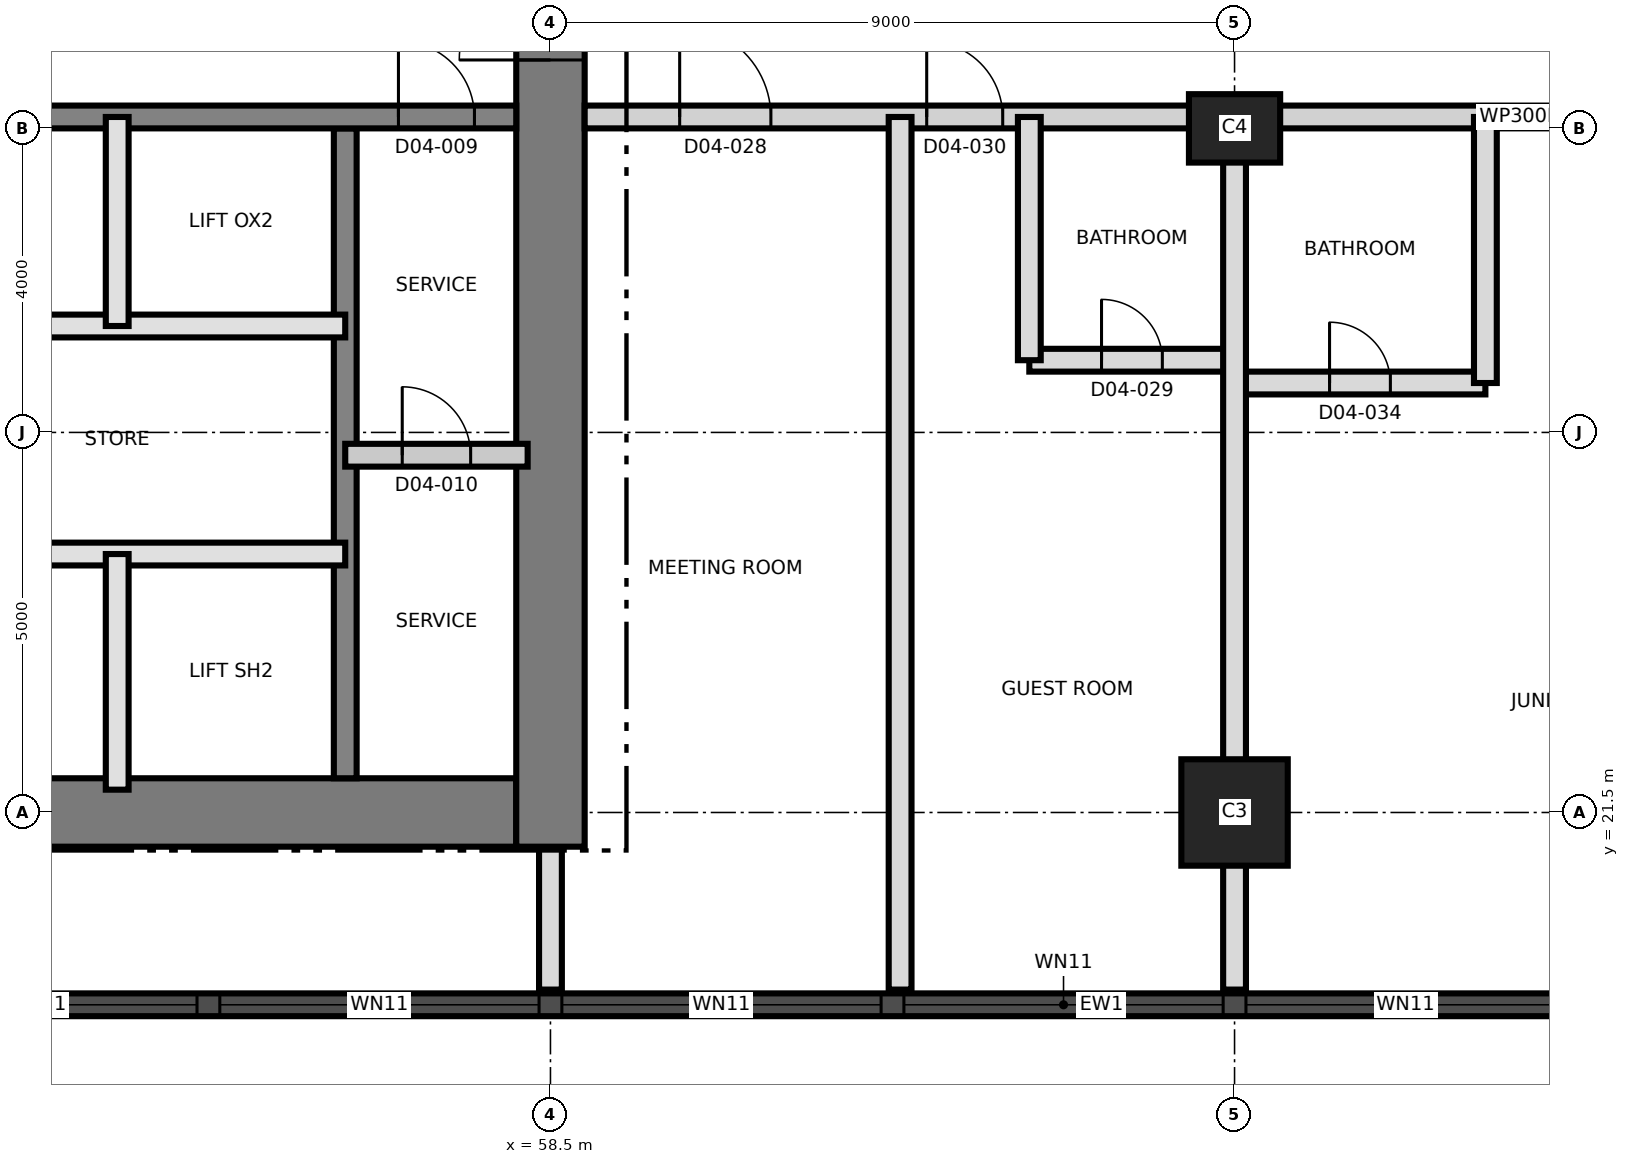
"""IFC4 building model, lengths in metres.
Left out: names, types, materials, properties, quantities, classifications, styles, units other than length and angle.
Written with IfcOpenShell. Run it as: python <this file> out.ifc"""

import sys

from ifc_helpers import new_model, si_unit, direction, frame, frame_2d, origin, origin_2d, place, context, subcontext, project, spatial, rectangle, extrude, element, fill, save


model = new_model("IFC4")
c1 = context("Model", 3, precision=1e-05, world=origin(), true_north=direction((0.0, 1.0)))
c2 = subcontext(c1, "Body", "Model", "MODEL_VIEW")
j1 = project(units=[si_unit("LENGTHUNIT", "METRE"), si_unit("PLANEANGLEUNIT", "RADIAN")], contexts=[c1])
p1 = place(None, origin())
s1 = spatial("IfcSite", under=j1, at=p1, CompositionType="ELEMENT")
p2 = place(p1, origin())
s2 = spatial("IfcBuilding", under=s1, at=p2, CompositionType="ELEMENT")
p3 = place(p2, frame((0.0, 0.0, 63.1)))
s3 = spatial("IfcBuildingStorey", under=s2, at=p3, CompositionType="ELEMENT", Elevation=63.1)
p4 = place(p3, frame((31.05, 21.5, 0.0), z_axis=(0.0, 0.0, 1.0), x_axis=(1.0, 0.0, 0.0)))
e1 = element("IfcWall", 1, at=p4, inside=s3, PredefinedType="SHEAR", context=c2, shape_type="SweptSolid", body=[
    extrude(rectangle(XDim=27.0, YDim=0.9, at=frame_2d((13.5, 0.0))), origin(), (0.0, 0.0, 1.0), 3.7),
])
p5 = place(p3, frame((58.5, 21.05, 0.0), z_axis=(0.0, 0.0, 1.0), x_axis=(0.0, 1.0, 0.0)))
e2 = element("IfcWall", 2, at=p5, inside=s3, PredefinedType="SHEAR", context=c2, shape_type="SweptSolid", body=[
    extrude(rectangle(XDim=18.9, YDim=0.9, at=frame_2d((9.45, 0.0))), origin(), (0.0, 0.0, 1.0), 3.7),
])
p6 = place(p5, frame((10.35, 0.0, 0.0)))
e3 = element("IfcOpeningElement", 3, at=p6, cuts=e2, PredefinedType="OPENING", context=c2, shape_type="SweptSolid", body=[
    extrude(rectangle(XDim=1.2, YDim=2.1, at=frame_2d((0.6, 1.05))), frame((0.0, 0.46, 0.0), z_axis=(0.0, -1.0, 0.0), x_axis=(1.0, 0.0, 0.0)), (0.0, 0.0, 1.0), 0.92),
])
p7 = place(p3, frame((55.8, 21.95, 0.0), z_axis=(0.0, 0.0, 1.0), x_axis=(0.0, 1.0, 0.0)))
e4 = element("IfcWall", 4, at=p7, inside=s3, PredefinedType="SHEAR", context=c2, shape_type="SweptSolid", body=[
    extrude(rectangle(XDim=8.55, YDim=0.3, at=frame_2d((4.275, 0.0))), origin(), (0.0, 0.0, 1.0), 3.7),
])
p8 = place(p3, frame((31.95, 30.65, 0.0), z_axis=(0.0, 0.0, 1.0), x_axis=(1.0, 0.0, 0.0)))
e5 = element("IfcWall", 5, at=p8, inside=s3, PredefinedType="SHEAR", context=c2, shape_type="SweptSolid", body=[
    extrude(rectangle(XDim=26.1, YDim=0.3, at=frame_2d((13.05, 0.0))), origin(), (0.0, 0.0, 1.0), 3.7),
])
p9 = place(p8, frame((24.55, 0.0, 0.0)))
e6 = element("IfcOpeningElement", 6, at=p9, cuts=e5, PredefinedType="OPENING", context=c2, shape_type="SweptSolid", body=[
    extrude(rectangle(XDim=1.0, YDim=2.1, at=frame_2d((0.5, 1.05))), frame((0.0, 0.16, 0.0), z_axis=(0.0, -1.0, 0.0), x_axis=(1.0, 0.0, 0.0)), (0.0, 0.0, 1.0), 0.32),
])
p10 = place(p8, frame((11.35, 0.0, 0.0)))
e7 = element("IfcOpeningElement", 7, at=p10, cuts=e5, PredefinedType="OPENING", context=c2, shape_type="SweptSolid", body=[
    extrude(rectangle(XDim=1.0, YDim=2.1, at=frame_2d((0.5, 1.05))), frame((0.0, 0.16, 0.0), z_axis=(0.0, -1.0, 0.0), x_axis=(1.0, 0.0, 0.0)), (0.0, 0.0, 1.0), 0.32),
])
p11 = place(p3, frame((67.5, 21.5, 0.0), z_axis=(0.0, 0.0, 1.0), x_axis=(1.0, 0.0, 0.0)))
e8 = element("IfcColumn", 8, at=p11, inside=s3, PredefinedType="COLUMN", context=c2, shape_type="SweptSolid", body=[
    extrude(rectangle(XDim=1.4, YDim=1.4, at=origin_2d()), origin(), (0.0, 0.0, 1.0), 3.7),
])
p12 = place(p3, frame((67.5, 30.5, 0.0), z_axis=(0.0, 0.0, 1.0), x_axis=(1.0, 0.0, 0.0)))
e9 = element("IfcColumn", 9, at=p12, inside=s3, PredefinedType="COLUMN", context=c2, shape_type="SweptSolid", body=[
    extrude(rectangle(XDim=1.2, YDim=0.9, at=origin_2d()), origin(), (0.0, 0.0, 1.0), 3.7),
])
p13 = place(p3, frame((44.01, 18.97, 0.0), z_axis=(0.0, 0.0, 1.0), x_axis=(1.0, 0.0, 0.0)))
e10 = element("IfcWall", 10, at=p13, inside=s3, PredefinedType="SOLIDWALL", context=c2, shape_type="SweptSolid", body=[
    extrude(rectangle(XDim=43.478, YDim=0.3, at=frame_2d((21.739, 0.0))), origin(), (0.0, 0.0, 1.0), 3.4),
])
p14 = place(p13, frame((1.845, 0.0, 0.3)))
e11 = element("IfcOpeningElement", 11, at=p14, cuts=e10, PredefinedType="OPENING", context=c2, shape_type="SweptSolid", body=[
    extrude(rectangle(XDim=1.8, YDim=2.4, at=frame_2d((0.9, 1.2))), frame((0.0, 0.16, 0.0), z_axis=(0.0, -1.0, 0.0), x_axis=(1.0, 0.0, 0.0)), (0.0, 0.0, 1.0), 0.32),
])
p15 = place(p13, frame((5.64, 0.0, 0.9)))
e12 = element("IfcOpeningElement", 12, at=p15, cuts=e10, PredefinedType="OPENING", context=c2, shape_type="SweptSolid", body=[
    extrude(rectangle(XDim=4.2, YDim=1.5, at=frame_2d((2.1, 0.75))), frame((0.0, 0.16, 0.0), z_axis=(0.0, -1.0, 0.0), x_axis=(1.0, 0.0, 0.0)), (0.0, 0.0, 1.0), 0.32),
])
p16 = place(p13, frame((10.14, 0.0, 0.9)))
e13 = element("IfcOpeningElement", 13, at=p16, cuts=e10, PredefinedType="OPENING", context=c2, shape_type="SweptSolid", body=[
    extrude(rectangle(XDim=4.2, YDim=1.5, at=frame_2d((2.1, 0.75))), frame((0.0, 0.16, 0.0), z_axis=(0.0, -1.0, 0.0), x_axis=(1.0, 0.0, 0.0)), (0.0, 0.0, 1.0), 0.32),
])
p17 = place(p13, frame((14.64, 0.0, 0.9)))
e14 = element("IfcOpeningElement", 14, at=p17, cuts=e10, PredefinedType="OPENING", context=c2, shape_type="SweptSolid", body=[
    extrude(rectangle(XDim=4.2, YDim=1.5, at=frame_2d((2.1, 0.75))), frame((0.0, 0.16, 0.0), z_axis=(0.0, -1.0, 0.0), x_axis=(1.0, 0.0, 0.0)), (0.0, 0.0, 1.0), 0.32),
])
p18 = place(p13, frame((19.14, 0.0, 0.9)))
e15 = element("IfcOpeningElement", 15, at=p18, cuts=e10, PredefinedType="OPENING", context=c2, shape_type="SweptSolid", body=[
    extrude(rectangle(XDim=4.2, YDim=1.5, at=frame_2d((2.1, 0.75))), frame((0.0, 0.16, 0.0), z_axis=(0.0, -1.0, 0.0), x_axis=(1.0, 0.0, 0.0)), (0.0, 0.0, 1.0), 0.32),
])
p19 = place(p13, frame((23.64, 0.0, 0.9)))
e16 = element("IfcOpeningElement", 16, at=p19, cuts=e10, PredefinedType="OPENING", context=c2, shape_type="SweptSolid", body=[
    extrude(rectangle(XDim=4.2, YDim=1.5, at=frame_2d((2.1, 0.75))), frame((0.0, 0.16, 0.0), z_axis=(0.0, -1.0, 0.0), x_axis=(1.0, 0.0, 0.0)), (0.0, 0.0, 1.0), 0.32),
])
p20 = place(p13, frame((28.14, 0.0, 0.9)))
e17 = element("IfcOpeningElement", 17, at=p20, cuts=e10, PredefinedType="OPENING", context=c2, shape_type="SweptSolid", body=[
    extrude(rectangle(XDim=4.2, YDim=1.5, at=frame_2d((2.1, 0.75))), frame((0.0, 0.16, 0.0), z_axis=(0.0, -1.0, 0.0), x_axis=(1.0, 0.0, 0.0)), (0.0, 0.0, 1.0), 0.32),
])
p21 = place(p13, frame((32.64, 0.0, 0.9)))
e18 = element("IfcOpeningElement", 18, at=p21, cuts=e10, PredefinedType="OPENING", context=c2, shape_type="SweptSolid", body=[
    extrude(rectangle(XDim=4.2, YDim=1.5, at=frame_2d((2.1, 0.75))), frame((0.0, 0.16, 0.0), z_axis=(0.0, -1.0, 0.0), x_axis=(1.0, 0.0, 0.0)), (0.0, 0.0, 1.0), 0.32),
])
p22 = place(p13, frame((37.14, 0.0, 0.9)))
e19 = element("IfcOpeningElement", 19, at=p22, cuts=e10, PredefinedType="OPENING", context=c2, shape_type="SweptSolid", body=[
    extrude(rectangle(XDim=4.2, YDim=1.5, at=frame_2d((2.1, 0.75))), frame((0.0, 0.16, 0.0), z_axis=(0.0, -1.0, 0.0), x_axis=(1.0, 0.0, 0.0)), (0.0, 0.0, 1.0), 0.32),
])
p23 = place(p3, frame((46.8, 24.9, 0.0), z_axis=(0.0, 0.0, 1.0), x_axis=(1.0, 0.0, 0.0)))
e20 = element("IfcWall", 20, at=p23, inside=s3, PredefinedType="SOLIDWALL", context=c2, shape_type="SweptSolid", body=[
    extrude(rectangle(XDim=9.0, YDim=0.3, at=frame_2d((4.5, 0.0))), origin(), (0.0, 0.0, 1.0), 3.4),
])
p24 = place(p23, frame((1.05, 0.0, 0.0)))
e21 = element("IfcOpeningElement", 21, at=p24, cuts=e20, PredefinedType="OPENING", context=c2, shape_type="SweptSolid", body=[
    extrude(rectangle(XDim=0.9, YDim=2.1, at=frame_2d((0.45, 1.05))), frame((0.0, 0.16, 0.0), z_axis=(0.0, -1.0, 0.0), x_axis=(1.0, 0.0, 0.0)), (0.0, 0.0, 1.0), 0.32),
])
p25 = place(p3, frame((55.8, 26.2, 0.0), z_axis=(0.0, 0.0, 1.0), x_axis=(1.0, 0.0, 0.0)))
e22 = element("IfcWall", 22, at=p25, inside=s3, PredefinedType="PARTITIONING", context=c2, shape_type="SweptSolid", body=[
    extrude(rectangle(XDim=2.4, YDim=0.3, at=frame_2d((1.2, 0.0))), origin(), (0.0, 0.0, 1.0), 3.4),
])
p26 = place(p25, frame((0.75, 0.0, 0.0)))
e23 = element("IfcOpeningElement", 23, at=p26, cuts=e22, PredefinedType="OPENING", context=c2, shape_type="SweptSolid", body=[
    extrude(rectangle(XDim=0.9, YDim=2.1, at=frame_2d((0.45, 1.05))), frame((0.0, 0.16, 0.0), z_axis=(0.0, -1.0, 0.0), x_axis=(1.0, 0.0, 0.0)), (0.0, 0.0, 1.0), 0.32),
])
p27 = place(p3, frame((49.8, 27.9, 0.0), z_axis=(0.0, 0.0, 1.0), x_axis=(1.0, 0.0, 0.0)))
e24 = element("IfcWall", 24, at=p27, inside=s3, PredefinedType="SOLIDWALL", context=c2, shape_type="SweptSolid", body=[
    extrude(rectangle(XDim=6.0, YDim=0.3, at=frame_2d((3.0, 0.0))), origin(), (0.0, 0.0, 1.0), 3.4),
])
p28 = place(p3, frame((52.8, 21.8, 0.0), z_axis=(0.0, 0.0, 1.0), x_axis=(0.0, 1.0, 0.0)))
e25 = element("IfcWall", 25, at=p28, inside=s3, PredefinedType="SOLIDWALL", context=c2, shape_type="SweptSolid", body=[
    extrude(rectangle(XDim=3.1, YDim=0.3, at=frame_2d((1.55, 0.0))), origin(), (0.0, 0.0, 1.0), 3.4),
])
p29 = place(p3, frame((52.8, 27.9, 0.0), z_axis=(0.0, 0.0, 1.0), x_axis=(0.0, 1.0, 0.0)))
e26 = element("IfcWall", 26, at=p29, inside=s3, PredefinedType="SOLIDWALL", context=c2, shape_type="SweptSolid", body=[
    extrude(rectangle(XDim=2.75, YDim=0.3, at=frame_2d((1.375, 0.0))), origin(), (0.0, 0.0, 1.0), 3.4),
])
p30 = place(p3, frame((67.5, 27.15, 0.0), z_axis=(0.0, 0.0, 1.0), x_axis=(1.0, 0.0, 0.0)))
e27 = element("IfcWall", 27, at=p30, inside=s3, PredefinedType="PARTITIONING", context=c2, shape_type="SweptSolid", body=[
    extrude(rectangle(XDim=3.3, YDim=0.3, at=frame_2d((1.65, 0.0))), origin(), (0.0, 0.0, 1.0), 3.4),
])
p31 = place(p30, frame((1.25, 0.0, 0.0)))
e28 = element("IfcOpeningElement", 28, at=p31, cuts=e27, PredefinedType="OPENING", context=c2, shape_type="SweptSolid", body=[
    extrude(rectangle(XDim=0.8, YDim=2.1, at=frame_2d((0.4, 1.05))), frame((0.0, 0.16, 0.0), z_axis=(0.0, -1.0, 0.0), x_axis=(1.0, 0.0, 0.0)), (0.0, 0.0, 1.0), 0.32),
])
p32 = place(p3, frame((64.8, 27.45, 0.0), z_axis=(0.0, 0.0, 1.0), x_axis=(1.0, 0.0, 0.0)))
e29 = element("IfcWall", 29, at=p32, inside=s3, PredefinedType="PARTITIONING", context=c2, shape_type="SweptSolid", body=[
    extrude(rectangle(XDim=2.7, YDim=0.3, at=frame_2d((1.35, 0.0))), origin(), (0.0, 0.0, 1.0), 3.4),
])
p33 = place(p32, frame((0.95, 0.0, 0.0)))
e30 = element("IfcOpeningElement", 30, at=p33, cuts=e29, PredefinedType="OPENING", context=c2, shape_type="SweptSolid", body=[
    extrude(rectangle(XDim=0.8, YDim=2.1, at=frame_2d((0.4, 1.05))), frame((0.0, 0.16, 0.0), z_axis=(0.0, -1.0, 0.0), x_axis=(1.0, 0.0, 0.0)), (0.0, 0.0, 1.0), 0.32),
])
p34 = place(p3, frame((58.95, 30.65, 0.0), z_axis=(0.0, 0.0, 1.0), x_axis=(1.0, 0.0, 0.0)))
e31 = element("IfcWall", 31, at=p34, inside=s3, PredefinedType="PARTITIONING", context=c2, shape_type="SweptSolid", body=[
    extrude(rectangle(XDim=26.38, YDim=0.3, at=frame_2d((13.19, 0.0))), origin(), (0.0, 0.0, 1.0), 3.4),
])
p35 = place(p34, frame((1.25, 0.0, 0.0)))
e32 = element("IfcOpeningElement", 32, at=p35, cuts=e31, PredefinedType="OPENING", context=c2, shape_type="SweptSolid", body=[
    extrude(rectangle(XDim=1.2, YDim=2.1, at=frame_2d((0.6, 1.05))), frame((0.0, 0.16, 0.0), z_axis=(0.0, -1.0, 0.0), x_axis=(1.0, 0.0, 0.0)), (0.0, 0.0, 1.0), 0.32),
])
p36 = place(p34, frame((4.5, 0.0, 0.0)))
e33 = element("IfcOpeningElement", 33, at=p36, cuts=e31, PredefinedType="OPENING", context=c2, shape_type="SweptSolid", body=[
    extrude(rectangle(XDim=1.0, YDim=2.1, at=frame_2d((0.5, 1.05))), frame((0.0, 0.16, 0.0), z_axis=(0.0, -1.0, 0.0), x_axis=(1.0, 0.0, 0.0)), (0.0, 0.0, 1.0), 0.32),
])
p37 = place(p34, frame((14.2, 0.0, 0.0)))
e34 = element("IfcOpeningElement", 34, at=p37, cuts=e31, PredefinedType="OPENING", context=c2, shape_type="SweptSolid", body=[
    extrude(rectangle(XDim=1.0, YDim=2.4, at=frame_2d((0.5, 1.2))), frame((0.0, 0.16, 0.0), z_axis=(0.0, -1.0, 0.0), x_axis=(1.0, 0.0, 0.0)), (0.0, 0.0, 1.0), 0.32),
])
p38 = place(p34, frame((18.685, 0.0, 0.0)))
e35 = element("IfcOpeningElement", 35, at=p38, cuts=e31, PredefinedType="OPENING", context=c2, shape_type="SweptSolid", body=[
    extrude(rectangle(XDim=1.2, YDim=2.1, at=frame_2d((0.6, 1.05))), frame((0.0, 0.16, 0.0), z_axis=(0.0, -1.0, 0.0), x_axis=(1.0, 0.0, 0.0)), (0.0, 0.0, 1.0), 0.32),
])
p39 = place(p34, frame((21.935, 0.0, 0.0)))
e36 = element("IfcOpeningElement", 36, at=p39, cuts=e31, PredefinedType="OPENING", context=c2, shape_type="SweptSolid", body=[
    extrude(rectangle(XDim=1.0, YDim=2.1, at=frame_2d((0.5, 1.05))), frame((0.0, 0.16, 0.0), z_axis=(0.0, -1.0, 0.0), x_axis=(1.0, 0.0, 0.0)), (0.0, 0.0, 1.0), 0.32),
])
p40 = place(p3, frame((58.5, 19.17, 0.0), z_axis=(0.0, 0.0, 1.0), x_axis=(0.0, 1.0, 0.0)))
e37 = element("IfcWall", 37, at=p40, inside=s3, PredefinedType="PARTITIONING", context=c2, shape_type="SweptSolid", body=[
    extrude(rectangle(XDim=1.86, YDim=0.3, at=frame_2d((0.93, 0.0))), origin(), (0.0, 0.0, 1.0), 3.4),
])
p41 = place(p3, frame((63.1, 19.17, 0.0), z_axis=(0.0, 0.0, 1.0), x_axis=(0.0, 1.0, 0.0)))
e38 = element("IfcWall", 38, at=p41, inside=s3, PredefinedType="PARTITIONING", context=c2, shape_type="SweptSolid", body=[
    extrude(rectangle(XDim=11.48, YDim=0.3, at=frame_2d((5.74, 0.0))), origin(), (0.0, 0.0, 1.0), 3.4),
])
p42 = place(p3, frame((64.8, 27.45, 0.0), z_axis=(0.0, 0.0, 1.0), x_axis=(0.0, 1.0, 0.0)))
e39 = element("IfcWall", 39, at=p42, inside=s3, PredefinedType="PARTITIONING", context=c2, shape_type="SweptSolid", body=[
    extrude(rectangle(XDim=3.2, YDim=0.3, at=frame_2d((1.6, 0.0))), origin(), (0.0, 0.0, 1.0), 3.4),
])
p43 = place(p3, frame((67.5, 19.17, 0.0), z_axis=(0.0, 0.0, 1.0), x_axis=(0.0, 1.0, 0.0)))
e40 = element("IfcWall", 40, at=p43, inside=s3, PredefinedType="PARTITIONING", context=c2, shape_type="SweptSolid", body=[
    extrude(rectangle(XDim=11.48, YDim=0.3, at=frame_2d((5.74, 0.0))), origin(), (0.0, 0.0, 1.0), 3.4),
])
p44 = place(p3, frame((70.8, 27.15, 0.0), z_axis=(0.0, 0.0, 1.0), x_axis=(0.0, 1.0, 0.0)))
e41 = element("IfcWall", 41, at=p44, inside=s3, PredefinedType="PARTITIONING", context=c2, shape_type="SweptSolid", body=[
    extrude(rectangle(XDim=3.5, YDim=0.3, at=frame_2d((1.75, 0.0))), origin(), (0.0, 0.0, 1.0), 3.4),
])
p45 = place(p15, origin())
e42 = element("IfcWindow", 42, at=p45, inside=s3, PartitioningType="SINGLE_PANEL", PredefinedType="WINDOW", context=c2, shape_type="SweptSolid", body=[
    extrude(rectangle(XDim=4.2, YDim=1.5, at=frame_2d((2.1, 0.75))), frame((0.0, 0.03, 0.0), z_axis=(0.0, -1.0, 0.0), x_axis=(1.0, 0.0, 0.0)), (0.0, 0.0, 1.0), 0.06),
])
fill(e12, e42)
p46 = place(p16, origin())
e43 = element("IfcWindow", 43, at=p46, inside=s3, PartitioningType="SINGLE_PANEL", PredefinedType="WINDOW", context=c2, shape_type="SweptSolid", body=[
    extrude(rectangle(XDim=4.2, YDim=1.5, at=frame_2d((2.1, 0.75))), frame((0.0, 0.03, 0.0), z_axis=(0.0, -1.0, 0.0), x_axis=(1.0, 0.0, 0.0)), (0.0, 0.0, 1.0), 0.06),
])
fill(e13, e43)
p47 = place(p17, origin())
e44 = element("IfcWindow", 44, at=p47, inside=s3, PartitioningType="SINGLE_PANEL", PredefinedType="WINDOW", context=c2, shape_type="SweptSolid", body=[
    extrude(rectangle(XDim=4.2, YDim=1.5, at=frame_2d((2.1, 0.75))), frame((0.0, 0.03, 0.0), z_axis=(0.0, -1.0, 0.0), x_axis=(1.0, 0.0, 0.0)), (0.0, 0.0, 1.0), 0.06),
])
fill(e14, e44)
p48 = place(p18, origin())
e45 = element("IfcWindow", 45, at=p48, inside=s3, PartitioningType="SINGLE_PANEL", PredefinedType="WINDOW", context=c2, shape_type="SweptSolid", body=[
    extrude(rectangle(XDim=4.2, YDim=1.5, at=frame_2d((2.1, 0.75))), frame((0.0, 0.03, 0.0), z_axis=(0.0, -1.0, 0.0), x_axis=(1.0, 0.0, 0.0)), (0.0, 0.0, 1.0), 0.06),
])
fill(e15, e45)
p49 = place(p19, origin())
e46 = element("IfcWindow", 46, at=p49, inside=s3, PartitioningType="SINGLE_PANEL", PredefinedType="WINDOW", context=c2, shape_type="SweptSolid", body=[
    extrude(rectangle(XDim=4.2, YDim=1.5, at=frame_2d((2.1, 0.75))), frame((0.0, 0.03, 0.0), z_axis=(0.0, -1.0, 0.0), x_axis=(1.0, 0.0, 0.0)), (0.0, 0.0, 1.0), 0.06),
])
fill(e16, e46)
p50 = place(p9, origin())
e47 = element("IfcDoor", 47, at=p50, inside=s3, OperationType="SINGLE_SWING_LEFT", PredefinedType="DOOR", context=c2, shape_type="SweptSolid", body=[
    extrude(rectangle(XDim=1.0, YDim=2.1, at=frame_2d((0.5, 1.05))), frame((0.0, 0.025, 0.0), z_axis=(0.0, -1.0, 0.0), x_axis=(1.0, 0.0, 0.0)), (0.0, 0.0, 1.0), 0.05),
])
fill(e6, e47)
p51 = place(p26, origin())
e48 = element("IfcDoor", 48, at=p51, inside=s3, OperationType="SINGLE_SWING_RIGHT", PredefinedType="DOOR", context=c2, shape_type="SweptSolid", body=[
    extrude(rectangle(XDim=0.9, YDim=2.1, at=frame_2d((0.45, 1.05))), frame((0.0, 0.025, 0.0), z_axis=(0.0, -1.0, 0.0), x_axis=(1.0, 0.0, 0.0)), (0.0, 0.0, 1.0), 0.05),
])
fill(e23, e48)
p52 = place(p6, origin())
e49 = element("IfcDoor", 49, at=p52, inside=s3, OperationType="SINGLE_SWING_LEFT", PredefinedType="DOOR", context=c2, shape_type="SweptSolid", body=[
    extrude(rectangle(XDim=1.2, YDim=2.1, at=frame_2d((0.6, 1.05))), frame((0.0, 0.025, 0.0), z_axis=(0.0, -1.0, 0.0), x_axis=(1.0, 0.0, 0.0)), (0.0, 0.0, 1.0), 0.05),
])
fill(e3, e49)
p53 = place(p35, origin())
e50 = element("IfcDoor", 50, at=p53, inside=s3, OperationType="SINGLE_SWING_RIGHT", PredefinedType="DOOR", context=c2, shape_type="SweptSolid", body=[
    extrude(rectangle(XDim=1.2, YDim=2.1, at=frame_2d((0.6, 1.05))), frame((0.0, 0.025, 0.0), z_axis=(0.0, -1.0, 0.0), x_axis=(1.0, 0.0, 0.0)), (0.0, 0.0, 1.0), 0.05),
])
fill(e32, e50)
p54 = place(p33, origin())
e51 = element("IfcDoor", 51, at=p54, inside=s3, OperationType="SINGLE_SWING_LEFT", PredefinedType="DOOR", context=c2, shape_type="SweptSolid", body=[
    extrude(rectangle(XDim=0.8, YDim=2.1, at=frame_2d((0.4, 1.05))), frame((0.0, 0.025, 0.0), z_axis=(0.0, -1.0, 0.0), x_axis=(1.0, 0.0, 0.0)), (0.0, 0.0, 1.0), 0.05),
])
fill(e30, e51)
p55 = place(p36, origin())
e52 = element("IfcDoor", 52, at=p55, inside=s3, OperationType="SINGLE_SWING_LEFT", PredefinedType="DOOR", context=c2, shape_type="SweptSolid", body=[
    extrude(rectangle(XDim=1.0, YDim=2.1, at=frame_2d((0.5, 1.05))), frame((0.0, 0.025, 0.0), z_axis=(0.0, -1.0, 0.0), x_axis=(1.0, 0.0, 0.0)), (0.0, 0.0, 1.0), 0.05),
])
fill(e33, e52)
p56 = place(p31, origin())
e53 = element("IfcDoor", 53, at=p56, inside=s3, OperationType="SINGLE_SWING_LEFT", PredefinedType="DOOR", context=c2, shape_type="SweptSolid", body=[
    extrude(rectangle(XDim=0.8, YDim=2.1, at=frame_2d((0.4, 1.05))), frame((0.0, 0.025, 0.0), z_axis=(0.0, -1.0, 0.0), x_axis=(1.0, 0.0, 0.0)), (0.0, 0.0, 1.0), 0.05),
])
fill(e28, e53)
save(model, sys.argv[1])
